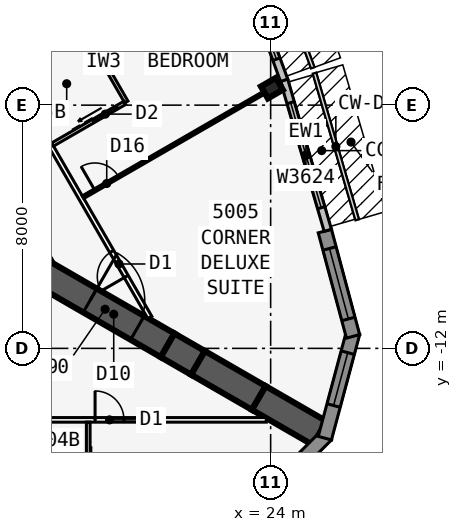
"""IFC4 building model, lengths in metres.
Left out: names, types, materials, properties, quantities, classifications, styles, units other than length and angle.
Written with IfcOpenShell. Run it as: python <this file> out.ifc"""

import sys

from ifc_helpers import new_model, si_unit, direction, frame, frame_2d, origin, origin_2d, place, context, subcontext, project, spatial, polyline, rectangle, i_section, outline, extrude, element, fill, save


model = new_model("IFC4")
c1 = context("Model", 3, precision=1e-05, world=origin(), true_north=direction((0.0, 1.0)))
c2 = subcontext(c1, "Body", "Model", "MODEL_VIEW")
j1 = project(units=[si_unit("LENGTHUNIT", "METRE"), si_unit("PLANEANGLEUNIT", "RADIAN")], contexts=[c1])
p1 = place(None, origin())
s1 = spatial("IfcSite", under=j1, at=p1, CompositionType="ELEMENT")
p2 = place(p1, origin())
s2 = spatial("IfcBuilding", under=s1, at=p2, CompositionType="ELEMENT")
p3 = place(p2, frame((0.0, 0.0, 186.1)))
s3 = spatial("IfcBuildingStorey", under=s2, at=p3, CompositionType="ELEMENT", Elevation=186.1)
p4 = place(p3, frame((16.5, -9.526, 0.0), z_axis=(0.0, 0.0, 1.0), x_axis=(-0.499999749417, 0.866025548458, 0.0)))
e1 = element("IfcWall", 1, at=p4, inside=s3, PredefinedType="SHEAR", context=c2, shape_type="SweptSolid", body=[
    extrude(rectangle(XDim=33.0, YDim=0.9, at=frame_2d((16.5, 0.0))), origin(), (0.0, 0.0, 1.0), 3.4),
])
p5 = place(p4, frame((14.15, 0.0, 0.0)))
e2 = element("IfcOpeningElement", 2, at=p5, cuts=e1, PredefinedType="OPENING", context=c2, shape_type="SweptSolid", body=[
    extrude(rectangle(XDim=1.8, YDim=2.13, at=frame_2d((0.9, 1.065))), frame((0.0, 0.46, 0.0), z_axis=(0.0, -1.0, 0.0), x_axis=(1.0, 0.0, 0.0)), (0.0, 0.0, 1.0), 0.92),
])
p6 = place(p4, frame((12.6, 0.0, 0.0)))
e3 = element("IfcOpeningElement", 3, at=p6, cuts=e1, PredefinedType="OPENING", context=c2, shape_type="SweptSolid", body=[
    extrude(rectangle(XDim=1.0, YDim=2.13, at=frame_2d((0.5, 1.065))), frame((0.0, 0.46, 0.0), z_axis=(0.0, -1.0, 0.0), x_axis=(1.0, 0.0, 0.0)), (0.0, 0.0, 1.0), 0.92),
])
p7 = place(p3, frame((16.5, -9.526, 0.0), z_axis=(0.0, 0.0, 1.0), x_axis=(0.866031398331, -0.499989616998, 0.0)))
e4 = element("IfcWall", 4, at=p7, inside=s3, PredefinedType="SHEAR", context=c2, shape_type="SweptSolid", body=[
    extrude(rectangle(XDim=4.746, YDim=0.9, at=frame_2d((2.373, 0.0))), origin(), (0.0, 0.0, 1.0), 3.4),
])
p8 = place(p7, frame((1.8, 0.0, 0.0)))
e5 = element("IfcOpeningElement", 5, at=p8, cuts=e4, PredefinedType="OPENING", context=c2, shape_type="SweptSolid", body=[
    extrude(rectangle(XDim=1.8, YDim=2.13, at=frame_2d((0.9, 1.065))), frame((0.0, 0.46, 0.0), z_axis=(0.0, -1.0, 0.0), x_axis=(1.0, 0.0, 0.0)), (0.0, 0.0, 1.0), 0.92),
])
p9 = place(p3, frame((20.61, -11.899, 0.0), z_axis=(0.0, 0.0, 1.0), x_axis=(0.866009537788, -0.500027479704, 0.0)))
e6 = element("IfcWall", 6, at=p9, inside=s3, PredefinedType="SHEAR", context=c2, shape_type="SweptSolid", body=[
    extrude(rectangle(XDim=1.155, YDim=0.9, at=frame_2d((0.577, 0.0))), origin(), (0.0, 0.0, 1.0), 3.4),
])
for number, where, z_axis, x_axis in (
    (7, (21.61, -12.477, 0.0), (0.0, 0.0, 1.0), (0.866, -0.5, 0.0)),
    (8, (23.61, -13.631, 0.0), (0.0, 0.0, 1.0), (0.866, -0.5, 0.0)),
):
    element("IfcWall", number, at=place(p3, frame(where, z_axis=z_axis, x_axis=x_axis)), inside=s3, PredefinedType="SHEAR", context=c2, shape_type="SweptSolid", body=[
        extrude(rectangle(XDim=2.309, YDim=0.9, at=frame_2d((1.155, 0.0))), origin(), (0.0, 0.0, 1.0), 3.4),
    ])
p10 = place(p3, frame((24.041, -3.44, 0.0), z_axis=(0.0, 0.0, 1.0), x_axis=(-0.5, 0.866025403784, 0.0)))
e9 = element("IfcColumn", 9, at=p10, inside=s3, PredefinedType="COLUMN", context=c2, shape_type="SweptSolid", body=[
    extrude(i_section(OverallWidth=0.455, OverallDepth=0.569, WebThickness=0.078, FlangeThickness=0.125, at=origin_2d()), origin(), (0.0, 0.0, 1.0), 3.4),
])
p11 = place(p3, frame((23.305, -17.388, 0.0), z_axis=(0.0, 0.0, 1.0), x_axis=(0.707106781187, 0.707106781187, 0.0)))
e10 = element("IfcWall", 10, at=p11, inside=s3, PredefinedType="SOLIDWALL", context=c2, shape_type="SweptSolid", body=[
    extrude(outline(polyline([(3.586, 0.225), (3.527, 0.225), (3.035, 0.093), (3.0, 0.225), (0.0, 0.225), (0.0, -0.225), (3.586, -0.225), (3.586, 0.225)])), origin(), (0.0, 0.0, 1.0), 3.15),
])
p12 = place(p11, frame((0.675, 0.0, 0.45)))
e11 = element("IfcOpeningElement", 11, at=p12, cuts=e10, PredefinedType="OPENING", context=c2, shape_type="SweptSolid", body=[
    extrude(rectangle(XDim=1.8, YDim=2.4, at=frame_2d((0.9, 1.2))), frame((0.0, 0.235, 0.0), z_axis=(0.0, -1.0, 0.0), x_axis=(1.0, 0.0, 0.0)), (0.0, 0.0, 1.0), 0.47),
])
p13 = place(p3, frame((25.783, -14.953, 0.0), z_axis=(0.0, 0.0, 1.0), x_axis=(0.258823421857, 0.965924653531, 0.0)))
e12 = element("IfcWall", 12, at=p13, inside=s3, PredefinedType="SOLIDWALL", context=c2, shape_type="SweptSolid", body=[
    extrude(outline(polyline([(3.586, 0.225), (0.586, 0.225), (0.551, 0.093), (0.06, 0.225), (0.0, 0.225), (0.0, -0.225), (3.586, -0.225), (3.586, 0.225)])), origin(), (0.0, 0.0, 1.0), 3.15),
])
p14 = place(p13, frame((1.111, 0.0, 0.45)))
e13 = element("IfcOpeningElement", 13, at=p14, cuts=e12, PredefinedType="OPENING", context=c2, shape_type="SweptSolid", body=[
    extrude(rectangle(XDim=1.8, YDim=2.4, at=frame_2d((0.9, 1.2))), frame((0.0, 0.235, 0.0), z_axis=(0.0, -1.0, 0.0), x_axis=(1.0, 0.0, 0.0)), (0.0, 0.0, 1.0), 0.47),
])
p15 = place(p3, frame((26.711, -11.605, 0.0), z_axis=(0.0, 0.0, 1.0), x_axis=(-0.258823421857, 0.965924653531, 0.0)))
e14 = element("IfcWall", 14, at=p15, inside=s3, PredefinedType="SOLIDWALL", context=c2, shape_type="SweptSolid", body=[
    extrude(rectangle(XDim=3.586, YDim=0.45, at=frame_2d((1.793, 0.0))), origin(), (0.0, 0.0, 1.0), 3.15),
])
p16 = place(p15, frame((0.593, 0.0, 0.45)))
e15 = element("IfcOpeningElement", 15, at=p16, cuts=e14, PredefinedType="OPENING", context=c2, shape_type="SweptSolid", body=[
    extrude(rectangle(XDim=2.4, YDim=2.4, at=frame_2d((1.2, 1.2))), frame((0.0, 0.235, 0.0), z_axis=(0.0, -1.0, 0.0), x_axis=(1.0, 0.0, 0.0)), (0.0, 0.0, 1.0), 0.47),
])
p17 = place(p3, frame((25.88, -8.118, 0.0), z_axis=(0.0, 0.0, 1.0), x_axis=(-0.279528287117, 0.960137457191, 0.0)))
e16 = element("IfcWall", 16, at=p17, inside=s3, PredefinedType="STANDARD", context=c2, shape_type="SweptSolid", body=[
    extrude(rectangle(XDim=5.148, YDim=0.25, at=frame_2d((2.574, 0.0))), origin(), (0.0, 0.0, 1.0), 3.15),
])
p18 = place(p17, frame((0.774, 0.0, 0.45)))
e17 = element("IfcOpeningElement", 17, at=p18, cuts=e16, PredefinedType="OPENING", context=c2, shape_type="SweptSolid", body=[
    extrude(rectangle(XDim=3.6, YDim=2.4, at=frame_2d((1.8, 1.2))), frame((0.0, 0.135, 0.0), z_axis=(0.0, -1.0, 0.0), x_axis=(1.0, 0.0, 0.0)), (0.0, 0.0, 1.0), 0.27),
])
p19 = place(p3, frame((24.444, -3.183, 0.0), z_axis=(0.0, 0.0, 1.0), x_axis=(-0.343225593282, 0.939252996863, 0.0)))
e18 = element("IfcWall", 18, at=p19, inside=s3, PredefinedType="STANDARD", context=c2, shape_type="SweptSolid", body=[
    extrude(rectangle(XDim=5.076, YDim=0.25, at=frame_2d((2.538, 0.0))), origin(), (0.0, 0.0, 1.0), 3.15),
])
p20 = place(p19, frame((0.738, 0.0, 0.45)))
e19 = element("IfcOpeningElement", 19, at=p20, cuts=e18, PredefinedType="OPENING", context=c2, shape_type="SweptSolid", body=[
    extrude(rectangle(XDim=3.6, YDim=2.4, at=frame_2d((1.8, 1.2))), frame((0.0, 0.135, 0.0), z_axis=(0.0, -1.0, 0.0), x_axis=(1.0, 0.0, 0.0)), (0.0, 0.0, 1.0), 0.27),
])
p21 = place(p3, frame((-23.857, -14.351, 0.0), z_axis=(0.0, 0.0, 1.0), x_axis=(1.0, 0.0, 0.0)))
e20 = element("IfcWall", 20, at=p21, inside=s3, PredefinedType="PARTITIONING", context=c2, shape_type="SweptSolid", body=[
    extrude(rectangle(XDim=47.714, YDim=0.15, at=frame_2d((23.857, 0.0))), origin(), (0.0, 0.0, 1.0), 3.15),
])
p22 = place(p21, frame((4.123, 0.0, 0.0)))
e21 = element("IfcOpeningElement", 21, at=p22, cuts=e20, PredefinedType="OPENING", context=c2, shape_type="SweptSolid", body=[
    extrude(rectangle(XDim=0.95, YDim=2.13, at=frame_2d((0.475, 1.065))), frame((0.0, 0.085, 0.0), z_axis=(0.0, -1.0, 0.0), x_axis=(1.0, 0.0, 0.0)), (0.0, 0.0, 1.0), 0.17),
])
p23 = place(p21, frame((17.082, 0.0, 0.0)))
e22 = element("IfcOpeningElement", 22, at=p23, cuts=e20, PredefinedType="OPENING", context=c2, shape_type="SweptSolid", body=[
    extrude(rectangle(XDim=0.95, YDim=2.13, at=frame_2d((0.475, 1.065))), frame((0.0, 0.085, 0.0), z_axis=(0.0, -1.0, 0.0), x_axis=(1.0, 0.0, 0.0)), (0.0, 0.0, 1.0), 0.17),
])
p24 = place(p21, frame((25.857, 0.0, 0.0)))
e23 = element("IfcOpeningElement", 23, at=p24, cuts=e20, PredefinedType="OPENING", context=c2, shape_type="SweptSolid", body=[
    extrude(rectangle(XDim=1.0, YDim=2.13, at=frame_2d((0.5, 1.065))), frame((0.0, 0.085, 0.0), z_axis=(0.0, -1.0, 0.0), x_axis=(1.0, 0.0, 0.0)), (0.0, 0.0, 1.0), 0.17),
])
p25 = place(p21, frame((30.882, 0.0, 0.0)))
e24 = element("IfcOpeningElement", 24, at=p25, cuts=e20, PredefinedType="OPENING", context=c2, shape_type="SweptSolid", body=[
    extrude(rectangle(XDim=0.95, YDim=2.13, at=frame_2d((0.475, 1.065))), frame((0.0, 0.085, 0.0), z_axis=(0.0, -1.0, 0.0), x_axis=(1.0, 0.0, 0.0)), (0.0, 0.0, 1.0), 0.17),
])
p26 = place(p21, frame((42.082, 0.0, 0.0)))
e25 = element("IfcOpeningElement", 25, at=p26, cuts=e20, PredefinedType="OPENING", context=c2, shape_type="SweptSolid", body=[
    extrude(rectangle(XDim=0.95, YDim=2.13, at=frame_2d((0.475, 1.065))), frame((0.0, 0.085, 0.0), z_axis=(0.0, -1.0, 0.0), x_axis=(1.0, 0.0, 0.0)), (0.0, 0.0, 1.0), 0.17),
])
p27 = place(p3, frame((18.0, -14.426, 0.0), z_axis=(0.0, 0.0, 1.0), x_axis=(0.0, -1.0, 0.0)))
e26 = element("IfcWall", 26, at=p27, inside=s3, PredefinedType="PLUMBINGWALL", context=c2, shape_type="SweptSolid", body=[
    extrude(rectangle(XDim=2.74, YDim=0.12, at=frame_2d((1.37, 0.0))), origin(), (0.0, 0.0, 1.0), 3.15),
])
p28 = place(p27, frame((1.55, 0.0, 0.0)))
e27 = element("IfcOpeningElement", 27, at=p28, cuts=e26, PredefinedType="OPENING", context=c2, shape_type="SweptSolid", body=[
    extrude(rectangle(XDim=0.9, YDim=2.13, at=frame_2d((0.45, 1.065))), frame((0.0, 0.07, 0.0), z_axis=(0.0, -1.0, 0.0), x_axis=(1.0, 0.0, 0.0)), (0.0, 0.0, 1.0), 0.14),
])
p29 = place(p3, frame((20.027, -10.985, 0.0), z_axis=(0.0, 0.0, 1.0), x_axis=(-0.500001677587, 0.866024435227, 0.0)))
e28 = element("IfcWall", 28, at=p29, inside=s3, PredefinedType="PARTITIONING", context=c2, shape_type="SweptSolid", body=[
    extrude(rectangle(XDim=39.054, YDim=0.15, at=frame_2d((19.527, 0.0))), origin(), (0.0, 0.0, 1.0), 3.15),
])
p30 = place(p29, frame((1.558, 0.0, 0.0)))
e29 = element("IfcOpeningElement", 29, at=p30, cuts=e28, PredefinedType="OPENING", context=c2, shape_type="SweptSolid", body=[
    extrude(rectangle(XDim=0.95, YDim=2.13, at=frame_2d((0.475, 1.065))), frame((0.0, 0.085, 0.0), z_axis=(0.0, -1.0, 0.0), x_axis=(1.0, 0.0, 0.0)), (0.0, 0.0, 1.0), 0.17),
])
p31 = place(p29, frame((12.752, 0.0, 0.0)))
e30 = element("IfcOpeningElement", 30, at=p31, cuts=e28, PredefinedType="OPENING", context=c2, shape_type="SweptSolid", body=[
    extrude(rectangle(XDim=0.95, YDim=2.13, at=frame_2d((0.475, 1.065))), frame((0.0, 0.085, 0.0), z_axis=(0.0, -1.0, 0.0), x_axis=(1.0, 0.0, 0.0)), (0.0, 0.0, 1.0), 0.17),
])
p32 = place(p29, frame((26.552, 0.0, 0.0)))
e31 = element("IfcOpeningElement", 31, at=p32, cuts=e28, PredefinedType="OPENING", context=c2, shape_type="SweptSolid", body=[
    extrude(rectangle(XDim=0.95, YDim=2.13, at=frame_2d((0.475, 1.065))), frame((0.0, 0.085, 0.0), z_axis=(0.0, -1.0, 0.0), x_axis=(1.0, 0.0, 0.0)), (0.0, 0.0, 1.0), 0.17),
])
p33 = place(p29, frame((37.752, 0.0, 0.0)))
e32 = element("IfcOpeningElement", 32, at=p33, cuts=e28, PredefinedType="OPENING", context=c2, shape_type="SweptSolid", body=[
    extrude(rectangle(XDim=0.95, YDim=2.13, at=frame_2d((0.475, 1.065))), frame((0.0, 0.085, 0.0), z_axis=(0.0, -1.0, 0.0), x_axis=(1.0, 0.0, 0.0)), (0.0, 0.0, 1.0), 0.17),
])
p34 = place(p3, frame((17.829, -7.027, 0.0), z_axis=(0.0, 0.0, 1.0), x_axis=(0.866029804378, 0.499992377871, 0.0)))
e33 = element("IfcWall", 33, at=p34, inside=s3, PredefinedType="PARTITIONING", context=c2, shape_type="SweptSolid", body=[
    extrude(rectangle(XDim=7.516, YDim=0.1, at=frame_2d((3.758, 0.0))), origin(), (0.0, 0.0, 1.0), 2.05),
])
p35 = place(p34, frame((0.45, 0.0, 0.0)))
e34 = element("IfcOpeningElement", 34, at=p35, cuts=e33, PredefinedType="OPENING", context=c2, shape_type="SweptSolid", body=[
    extrude(rectangle(XDim=0.9, YDim=2.032, at=frame_2d((0.45, 1.016))), frame((0.0, 0.06, 0.0), z_axis=(0.0, -1.0, 0.0), x_axis=(1.0, 0.0, 0.0)), (0.0, 0.0, 1.0), 0.12),
])
p36 = place(p3, frame((15.329, -2.697, 0.0), z_axis=(0.0, 0.0, 1.0), x_axis=(0.866024316602, 0.50000188305, 0.0)))
e35 = element("IfcWall", 35, at=p36, inside=s3, PredefinedType="PARTITIONING", context=c2, shape_type="SweptSolid", body=[
    extrude(rectangle(XDim=8.395, YDim=0.15, at=frame_2d((4.198, 0.0))), origin(), (0.0, 0.0, 1.0), 2.108),
])
p37 = place(p3, frame((19.253, -3.895, 0.0), z_axis=(0.0, 0.0, 1.0), x_axis=(-0.499990139034, 0.866031096941, 0.0)))
e36 = element("IfcWall", 36, at=p37, inside=s3, PredefinedType="PLUMBINGWALL", context=c2, shape_type="SweptSolid", body=[
    extrude(rectangle(XDim=3.0, YDim=0.12, at=frame_2d((1.5, 0.0))), origin(), (0.0, 0.0, 1.0), 3.15),
])
p38 = place(p3, frame((16.829, -5.295, 0.0), z_axis=(0.0, 0.0, 1.0), x_axis=(0.866035715982, 0.499982138324, 0.0)))
e37 = element("IfcWall", 37, at=p38, inside=s3, PredefinedType="PLUMBINGWALL", context=c2, shape_type="SweptSolid", body=[
    extrude(rectangle(XDim=2.74, YDim=0.12, at=frame_2d((1.37, 0.0))), origin(), (0.0, 0.0, 1.0), 3.15),
])
p39 = place(p38, frame((1.55, 0.0, 0.0)))
e38 = element("IfcOpeningElement", 38, at=p39, cuts=e37, PredefinedType="OPENING", context=c2, shape_type="SweptSolid", body=[
    extrude(rectangle(XDim=0.9, YDim=2.13, at=frame_2d((0.45, 1.065))), frame((0.0, 0.07, 0.0), z_axis=(0.0, -1.0, 0.0), x_axis=(1.0, 0.0, 0.0)), (0.0, 0.0, 1.0), 0.14),
])
p40 = place(p14, origin())
e39 = element("IfcWindow", 39, at=p40, inside=s3, PartitioningType="SINGLE_PANEL", PredefinedType="WINDOW", context=c2, shape_type="SweptSolid", body=[
    extrude(rectangle(XDim=1.8, YDim=2.4, at=frame_2d((0.9, 1.2))), frame((0.0, 0.03, 0.0), z_axis=(0.0, -1.0, 0.0), x_axis=(1.0, 0.0, 0.0)), (0.0, 0.0, 1.0), 0.06),
])
fill(e13, e39)
p41 = place(p16, origin())
e40 = element("IfcWindow", 40, at=p41, inside=s3, PartitioningType="SINGLE_PANEL", PredefinedType="WINDOW", context=c2, shape_type="SweptSolid", body=[
    extrude(rectangle(XDim=2.4, YDim=2.4, at=frame_2d((1.2, 1.2))), frame((0.0, 0.03, 0.0), z_axis=(0.0, -1.0, 0.0), x_axis=(1.0, 0.0, 0.0)), (0.0, 0.0, 1.0), 0.06),
])
fill(e15, e40)
p42 = place(p18, origin())
e41 = element("IfcWindow", 41, at=p42, inside=s3, PartitioningType="SINGLE_PANEL", PredefinedType="WINDOW", context=c2, shape_type="SweptSolid", body=[
    extrude(rectangle(XDim=3.6, YDim=2.4, at=frame_2d((1.8, 1.2))), frame((0.0, 0.03, 0.0), z_axis=(0.0, -1.0, 0.0), x_axis=(1.0, 0.0, 0.0)), (0.0, 0.0, 1.0), 0.06),
])
fill(e17, e41)
p43 = place(p20, origin())
e42 = element("IfcWindow", 42, at=p43, inside=s3, PartitioningType="SINGLE_PANEL", PredefinedType="WINDOW", context=c2, shape_type="SweptSolid", body=[
    extrude(rectangle(XDim=3.6, YDim=2.4, at=frame_2d((1.8, 1.2))), frame((0.0, 0.03, 0.0), z_axis=(0.0, -1.0, 0.0), x_axis=(1.0, 0.0, 0.0)), (0.0, 0.0, 1.0), 0.06),
])
fill(e19, e42)
p44 = place(p26, origin())
e43 = element("IfcDoor", 43, at=p44, inside=s3, OperationType="SINGLE_SWING_LEFT", PredefinedType="DOOR", context=c2, shape_type="SweptSolid", body=[
    extrude(rectangle(XDim=0.95, YDim=2.13, at=frame_2d((0.475, 1.065))), frame((0.0, 0.025, 0.0), z_axis=(0.0, -1.0, 0.0), x_axis=(1.0, 0.0, 0.0)), (0.0, 0.0, 1.0), 0.05),
])
fill(e25, e43)
p45 = place(p35, origin())
e44 = element("IfcDoor", 44, at=p45, inside=s3, OperationType="SINGLE_SWING_LEFT", PredefinedType="DOOR", context=c2, shape_type="SweptSolid", body=[
    extrude(rectangle(XDim=0.9, YDim=2.032, at=frame_2d((0.45, 1.016))), frame((0.0, 0.025, 0.0), z_axis=(0.0, -1.0, 0.0), x_axis=(1.0, 0.0, 0.0)), (0.0, 0.0, 1.0), 0.05),
])
fill(e34, e44)
p46 = place(p30, origin())
e45 = element("IfcDoor", 45, at=p46, inside=s3, OperationType="SINGLE_SWING_LEFT", PredefinedType="DOOR", context=c2, shape_type="SweptSolid", body=[
    extrude(rectangle(XDim=0.95, YDim=2.13, at=frame_2d((0.475, 1.065))), frame((0.0, 0.025, 0.0), z_axis=(0.0, -1.0, 0.0), x_axis=(1.0, 0.0, 0.0)), (0.0, 0.0, 1.0), 0.05),
])
fill(e29, e45)
p47 = place(p39, origin())
e46 = element("IfcDoor", 46, at=p47, inside=s3, OperationType="SLIDING_TO_LEFT", PredefinedType="DOOR", context=c2, shape_type="SweptSolid", body=[
    extrude(rectangle(XDim=0.9, YDim=2.13, at=frame_2d((0.45, 1.065))), frame((0.0, 0.025, 0.0), z_axis=(0.0, -1.0, 0.0), x_axis=(1.0, 0.0, 0.0)), (0.0, 0.0, 1.0), 0.05),
])
fill(e38, e46)
p48 = place(p8, origin())
e47 = element("IfcDoor", 47, at=p48, inside=s3, OperationType="DOUBLE_DOOR_DOUBLE_SWING", PredefinedType="DOOR", context=c2, shape_type="SweptSolid", body=[
    extrude(rectangle(XDim=1.8, YDim=2.13, at=frame_2d((0.9, 1.065))), frame((0.0, 0.025, 0.0), z_axis=(0.0, -1.0, 0.0), x_axis=(1.0, 0.0, 0.0)), (0.0, 0.0, 1.0), 0.05),
])
fill(e5, e47)
save(model, sys.argv[1])
